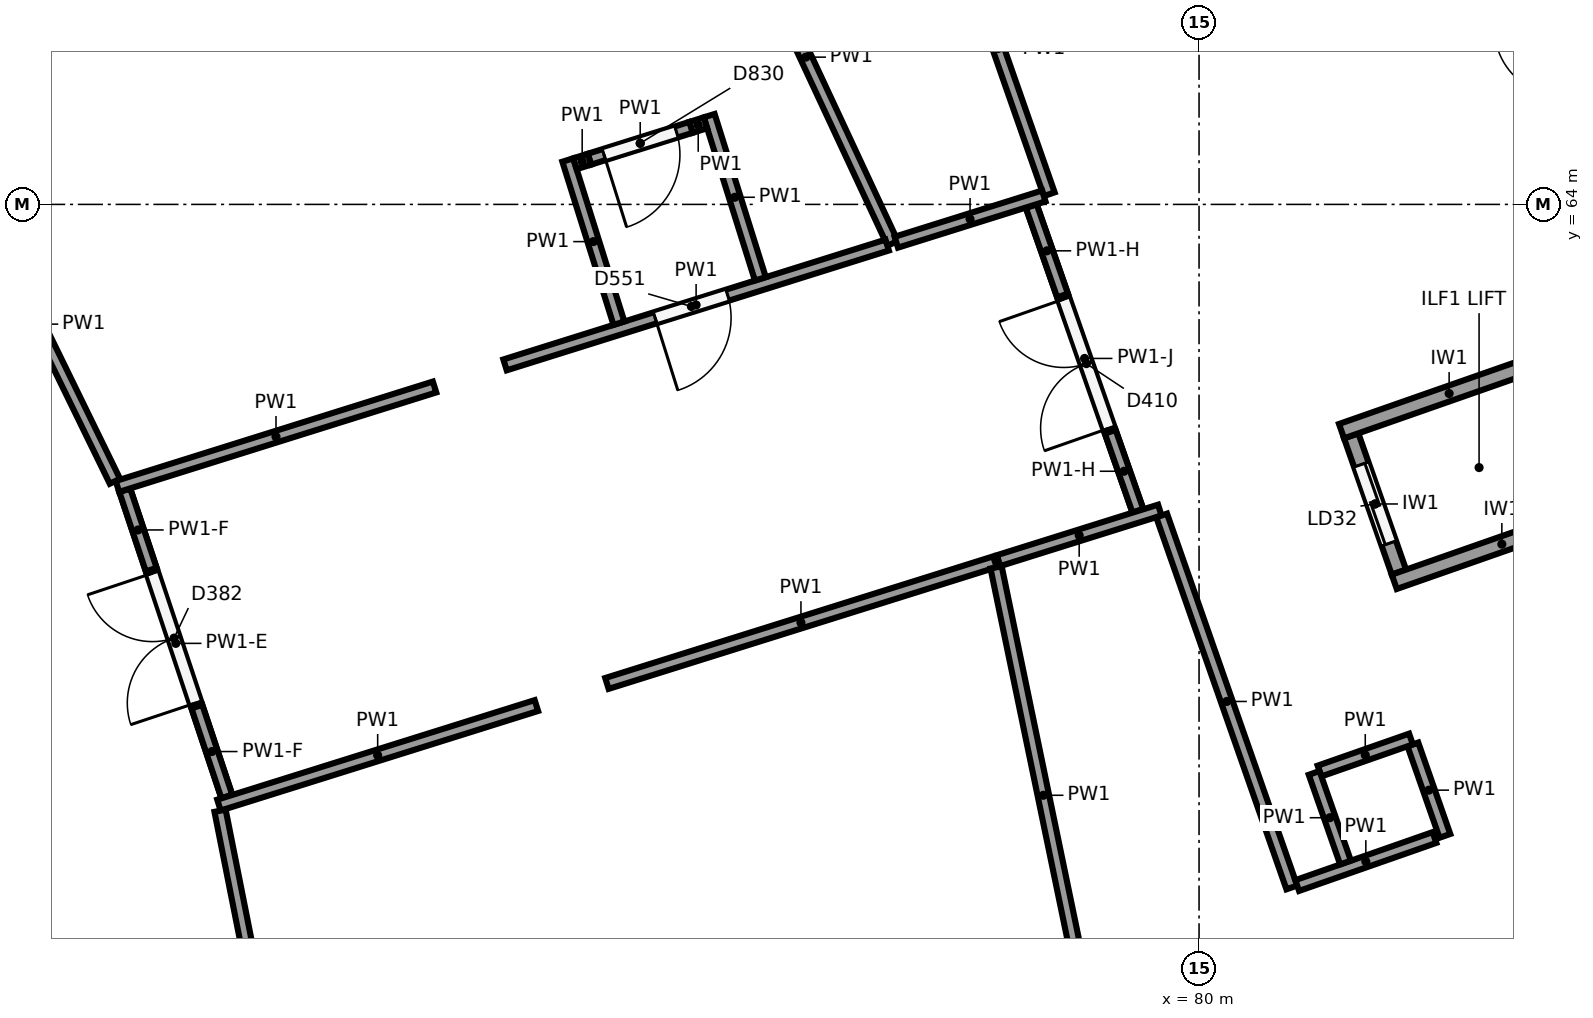
"""IFC4 building model, lengths in metres.
Left out: names, types, materials, properties, quantities, classifications, styles, units other than length and angle.
Written with IfcOpenShell. Run it as: python <this file> out.ifc"""

import sys

from ifc_helpers import new_model, si_unit, direction, frame, frame_2d, origin, origin_2d, place, context, subcontext, project, spatial, rectangle, circle, extrude, element, fill, save


model = new_model("IFC4")
c1 = context("Model", 3, precision=1e-05, world=origin(), true_north=direction((0.0, 1.0)))
c2 = subcontext(c1, "Body", "Model", "MODEL_VIEW")
j1 = project(units=[si_unit("LENGTHUNIT", "METRE"), si_unit("PLANEANGLEUNIT", "RADIAN")], contexts=[c1])
p1 = place(None, origin())
s1 = spatial("IfcSite", under=j1, at=p1, CompositionType="ELEMENT")
p2 = place(p1, origin())
s2 = spatial("IfcBuilding", under=s1, at=p2, CompositionType="ELEMENT")
p3 = place(p2, origin())
s3 = spatial("IfcBuildingStorey", under=s2, at=p3, CompositionType="ELEMENT", Elevation=0.0)
p4 = place(p3, frame((71.17, 59.677, 0.0), z_axis=(0.0, 0.0, 1.0), x_axis=(1.0, 0.0, 0.0)))
e1 = element("IfcColumn", 1, at=p4, inside=s3, PredefinedType="COLUMN", context=c2, shape_type="SweptSolid", body=[
    extrude(circle(Radius=0.45, at=origin_2d()), origin(), (0.0, 0.0, 1.0), 6.5),
])
p5 = place(p3, frame((82.12, 63.191, 0.0), z_axis=(0.0, 0.0, 1.0), x_axis=(1.0, 0.0, 0.0)))
e2 = element("IfcColumn", 2, at=p5, inside=s3, PredefinedType="COLUMN", context=c2, shape_type="SweptSolid", body=[
    extrude(circle(Radius=0.6, at=origin_2d()), origin(), (0.0, 0.0, 1.0), 6.5),
])
p6 = place(p3, frame((85.4, 60.025, 0.0), z_axis=(0.0, 0.0, 1.0), x_axis=(-0.943900215722, -0.330230802259, 0.0)))
e3 = element("IfcWall", 3, at=p6, inside=s3, PredefinedType="SHEAR", context=c2, shape_type="SweptSolid", body=[
    extrude(rectangle(XDim=3.0, YDim=0.2, at=frame_2d((1.5, 0.0))), origin(), (0.0, 0.0, 1.0), 6.15),
])
p7 = place(p3, frame((84.706, 62.008, 0.0), z_axis=(0.0, 0.0, 1.0), x_axis=(-0.943874847782, -0.330303302625, 0.0)))
e4 = element("IfcWall", 4, at=p7, inside=s3, PredefinedType="SHEAR", context=c2, shape_type="SweptSolid", body=[
    extrude(rectangle(XDim=3.0, YDim=0.2, at=frame_2d((1.5, 0.0))), origin(), (0.0, 0.0, 1.0), 6.15),
])
p8 = place(p3, frame((82.629, 59.162, 0.0), z_axis=(0.0, 0.0, 1.0), x_axis=(-0.330224505327, 0.943902418729, 0.0)))
e5 = element("IfcWall", 5, at=p8, inside=s3, PredefinedType="SHEAR", context=c2, shape_type="SweptSolid", body=[
    extrude(rectangle(XDim=1.9, YDim=0.2, at=frame_2d((0.95, 0.0))), origin(), (0.0, 0.0, 1.0), 6.15),
])
p9 = place(p8, frame((0.4, 0.0, 0.0)))
e6 = element("IfcOpeningElement", 6, at=p9, cuts=e5, PredefinedType="OPENING", context=c2, shape_type="SweptSolid", body=[
    extrude(rectangle(XDim=1.1, YDim=2.1, at=frame_2d((0.55, 1.05))), frame((0.0, 0.11, 0.0), z_axis=(0.0, -1.0, 0.0), x_axis=(1.0, 0.0, 0.0)), (0.0, 0.0, 1.0), 0.22),
])
p10 = place(p3, frame((67.104, 56.097, 0.0), z_axis=(0.0, 0.0, 1.0), x_axis=(0.954202691719, 0.299160864947, 0.0)))
e7 = element("IfcWall", 7, at=p10, inside=s3, PredefinedType="PARTITIONING", context=c2, shape_type="SweptSolid", body=[
    extrude(rectangle(XDim=4.377, YDim=0.15, at=frame_2d((2.189, 0.0))), origin(), (0.0, 0.0, 1.0), 6.15),
])
p11 = place(p3, frame((72.21, 57.698, 0.0), z_axis=(0.0, 0.0, 1.0), x_axis=(0.954194522847, 0.299186919115, 0.0)))
e8 = element("IfcWall", 8, at=p11, inside=s3, PredefinedType="PARTITIONING", context=c2, shape_type="SweptSolid", body=[
    extrude(rectangle(XDim=5.35, YDim=0.15, at=frame_2d((2.675, 0.0))), origin(), (0.0, 0.0, 1.0), 6.15),
])
p12 = place(p3, frame((77.33, 59.225, 0.0), z_axis=(0.0, 0.0, 1.0), x_axis=(0.20289695764, -0.979200094251, 0.0)))
e9 = element("IfcWall", 9, at=p12, inside=s3, PredefinedType="PARTITIONING", context=c2, shape_type="SweptSolid", body=[
    extrude(rectangle(XDim=6.124, YDim=0.15, at=frame_2d((3.062, 0.0))), origin(), (0.0, 0.0, 1.0), 6.15),
])
p13 = place(p3, frame((68.014, 51.518, 0.0), z_axis=(0.0, 0.0, 1.0), x_axis=(-0.194807566784, 0.980841481547, 0.0)))
e10 = element("IfcWall", 10, at=p13, inside=s3, PredefinedType="PARTITIONING", context=c2, shape_type="SweptSolid", body=[
    extrude(rectangle(XDim=4.593, YDim=0.15, at=frame_2d((2.296, 0.0))), origin(), (0.0, 0.0, 1.0), 6.15),
])
p14 = place(p3, frame((77.362, 59.313, 0.0), z_axis=(0.0, 0.0, 1.0), x_axis=(0.954198139725, 0.299175383588, 0.0)))
e11 = element("IfcWall", 11, at=p14, inside=s3, PredefinedType="PARTITIONING", context=c2, shape_type="SweptSolid", body=[
    extrude(rectangle(XDim=2.223, YDim=0.15, at=frame_2d((1.111, 0.0))), origin(), (0.0, 0.0, 1.0), 6.15),
])
p15 = place(p3, frame((79.508, 59.907, 0.0), z_axis=(0.0, 0.0, 1.0), x_axis=(0.330291692253, -0.943878910681, 0.0)))
e12 = element("IfcWall", 12, at=p15, inside=s3, PredefinedType="PARTITIONING", context=c2, shape_type="SweptSolid", body=[
    extrude(rectangle(XDim=5.185, YDim=0.15, at=frame_2d((2.592, 0.0))), origin(), (0.0, 0.0, 1.0), 6.15),
])
p16 = place(p3, frame((81.291, 55.039, 0.0), z_axis=(0.0, 0.0, 1.0), x_axis=(0.943910062753, 0.330202655097, 0.0)))
e13 = element("IfcWall", 13, at=p16, inside=s3, PredefinedType="PARTITIONING", context=c2, shape_type="SweptSolid", body=[
    extrude(rectangle(XDim=1.914, YDim=0.15, at=frame_2d((0.957, 0.0))), origin(), (0.0, 0.0, 1.0), 6.15),
])
p17 = place(p3, frame((73.684, 68.387, 0.0), z_axis=(0.0, 0.0, 1.0), x_axis=(0.42266047211, -0.906288102821, 0.0)))
e14 = element("IfcWall", 14, at=p17, inside=s3, PredefinedType="PARTITIONING", context=c2, shape_type="SweptSolid", body=[
    extrude(rectangle(XDim=5.406, YDim=0.15, at=frame_2d((2.703, 0.0))), origin(), (0.0, 0.0, 1.0), 6.15),
])
p18 = place(p3, frame((75.896, 63.465, 0.0), z_axis=(0.0, 0.0, 1.0), x_axis=(-0.954206671626, -0.29914817035, 0.0)))
e15 = element("IfcWall", 15, at=p18, inside=s3, PredefinedType="PARTITIONING", context=c2, shape_type="SweptSolid", body=[
    extrude(rectangle(XDim=5.269, YDim=0.15, at=frame_2d((2.634, 0.0))), origin(), (0.0, 0.0, 1.0), 6.15),
])
p19 = place(p18, frame((2.2, 0.0, 0.0)))
e16 = element("IfcOpeningElement", 16, at=p19, cuts=e15, PredefinedType="OPENING", context=c2, shape_type="SweptSolid", body=[
    extrude(rectangle(XDim=1.0, YDim=2.1, at=frame_2d((0.5, 1.05))), frame((0.0, 0.085, 0.0), z_axis=(0.0, -1.0, 0.0), x_axis=(1.0, 0.0, 0.0)), (0.0, 0.0, 1.0), 0.17),
])
p20 = place(p3, frame((69.942, 61.598, 0.0), z_axis=(0.0, 0.0, 1.0), x_axis=(-0.954192437986, -0.299193568262, 0.0)))
e17 = element("IfcWall", 17, at=p20, inside=s3, PredefinedType="PARTITIONING", context=c2, shape_type="SweptSolid", body=[
    extrude(rectangle(XDim=4.373, YDim=0.15, at=frame_2d((2.187, 0.0))), origin(), (0.0, 0.0, 1.0), 6.15),
])
p21 = place(p3, frame((65.736, 60.358, 0.0), z_axis=(0.0, 0.0, 1.0), x_axis=(-0.438916996059, 0.898527612581, 0.0)))
e18 = element("IfcWall", 18, at=p21, inside=s3, PredefinedType="PARTITIONING", context=c2, shape_type="SweptSolid", body=[
    extrude(rectangle(XDim=4.601, YDim=0.15, at=frame_2d((2.301, 0.0))), origin(), (0.0, 0.0, 1.0), 6.15),
])
p22 = place(p3, frame((76.688, 67.969, 0.0), z_axis=(0.0, 0.0, 1.0), x_axis=(0.330235334568, -0.943898630046, 0.0)))
e19 = element("IfcWall", 19, at=p22, inside=s3, PredefinedType="PARTITIONING", context=c2, shape_type="SweptSolid", body=[
    extrude(rectangle(XDim=4.063, YDim=0.15, at=frame_2d((2.032, 0.0))), origin(), (0.0, 0.0, 1.0), 6.15),
])
p23 = place(p3, frame((77.958, 64.111, 0.0), z_axis=(0.0, 0.0, 1.0), x_axis=(-0.954206277419, -0.299149427767, 0.0)))
e20 = element("IfcWall", 20, at=p23, inside=s3, PredefinedType="PARTITIONING", context=c2, shape_type="SweptSolid", body=[
    extrude(rectangle(XDim=2.035, YDim=0.15, at=frame_2d((1.017, 0.0))), origin(), (0.0, 0.0, 1.0), 6.15),
])
for number, where, z_axis, x_axis in (
    (21, (83.235, 55.692, 0.0), (0.0, 0.0, 1.0), (-0.33, 0.944, 0.0)),
    (22, (82.789, 56.966, 0.0), (0.0, 0.0, 1.0), (-0.944, -0.33, 0.0)),
):
    element("IfcWall", number, at=place(p3, frame(where, z_axis=z_axis, x_axis=x_axis)), inside=s3, PredefinedType="PARTITIONING", context=c2, shape_type="SweptSolid", body=[
        extrude(rectangle(XDim=1.275, YDim=0.15, at=frame_2d((0.637, 0.0))), origin(), (0.0, 0.0, 1.0), 6.15),
    ])
p24 = place(p3, frame((81.514, 56.521, 0.0), z_axis=(0.0, 0.0, 1.0), x_axis=(0.33032430547, -0.943867497701, 0.0)))
e23 = element("IfcWall", 23, at=p24, inside=s3, PredefinedType="PARTITIONING", context=c2, shape_type="SweptSolid", body=[
    extrude(rectangle(XDim=1.249, YDim=0.15, at=frame_2d((0.625, 0.0))), origin(), (0.0, 0.0, 1.0), 6.15),
])
for number, where, z_axis, x_axis in (
    (24, (74.228, 63.021, 0.0), (0.0, 0.0, 1.0), (-0.299, 0.954, 0.0)),
    (25, (72.367, 62.437, 0.0), (0.0, 0.0, 1.0), (-0.299, 0.954, 0.0)),
):
    element("IfcWall", number, at=place(p3, frame(where, z_axis=z_axis, x_axis=x_axis)), inside=s3, PredefinedType="PARTITIONING", context=c2, shape_type="SweptSolid", body=[
        extrude(rectangle(XDim=2.25, YDim=0.15, at=frame_2d((1.125, 0.0))), origin(), (0.0, 0.0, 1.0), 6.15),
    ])
p25 = place(p3, frame((73.506, 65.073, 0.0), z_axis=(0.0, 0.0, 1.0), x_axis=(-0.953803895117, -0.300429908065, 0.0)))
e26 = element("IfcWall", 26, at=p25, inside=s3, PredefinedType="PARTITIONING", context=c2, shape_type="SweptSolid", body=[
    extrude(rectangle(XDim=0.2, YDim=0.15, at=frame_2d((0.1, 0.0))), origin(), (0.0, 0.0, 1.0), 6.15),
])
p26 = place(p3, frame((73.315, 65.013, 0.0), z_axis=(0.0, 0.0, 1.0), x_axis=(-0.954231413478, -0.299069238691, 0.0)))
e27 = element("IfcWall", 27, at=p26, inside=s3, PredefinedType="PARTITIONING", context=c2, shape_type="SweptSolid", body=[
    extrude(rectangle(XDim=1.4, YDim=0.15, at=frame_2d((0.7, 0.0))), origin(), (0.0, 0.0, 1.0), 6.15),
])
p27 = place(p26, frame((0.2, 0.0, 0.0)))
e28 = element("IfcOpeningElement", 28, at=p27, cuts=e27, PredefinedType="OPENING", context=c2, shape_type="SweptSolid", body=[
    extrude(rectangle(XDim=1.0, YDim=2.1, at=frame_2d((0.5, 1.05))), frame((0.0, 0.085, 0.0), z_axis=(0.0, -1.0, 0.0), x_axis=(1.0, 0.0, 0.0)), (0.0, 0.0, 1.0), 0.17),
])
p28 = place(p3, frame((71.979, 64.595, 0.0), z_axis=(0.0, 0.0, 1.0), x_axis=(-0.954262592634, -0.298969738101, 0.0)))
e29 = element("IfcWall", 29, at=p28, inside=s3, PredefinedType="PARTITIONING", context=c2, shape_type="SweptSolid", body=[
    extrude(rectangle(XDim=0.2, YDim=0.15, at=frame_2d((0.1, 0.0))), origin(), (0.0, 0.0, 1.0), 6.15),
])
p29 = place(p3, frame((79.195, 59.97, 0.0), z_axis=(0.0, 0.0, 1.0), x_axis=(-0.330288941726, 0.943879873169, 0.0)))
e30 = element("IfcWall", 30, at=p29, inside=s3, PredefinedType="PARTITIONING", context=c2, shape_type="SweptSolid", body=[
    extrude(rectangle(XDim=4.245, YDim=0.15, at=frame_2d((2.123, 0.0))), origin(), (0.0, 0.0, 1.0), 5.05),
])
p30 = place(p29, frame((1.15, 0.0, 0.0)))
e31 = element("IfcOpeningElement", 31, at=p30, cuts=e30, PredefinedType="OPENING", context=c2, shape_type="SweptSolid", body=[
    extrude(rectangle(XDim=1.8, YDim=2.1, at=frame_2d((0.9, 1.05))), frame((0.0, 0.085, 0.0), z_axis=(0.0, -1.0, 0.0), x_axis=(1.0, 0.0, 0.0)), (0.0, 0.0, 1.0), 0.17),
])
p31 = place(p3, frame((79.195, 59.97, 5.05), z_axis=(0.0, 0.0, 1.0), x_axis=(-0.330310872881, 0.943872198582, 0.0)))
e32 = element("IfcWall", 32, at=p31, inside=s3, PredefinedType="PARTITIONING", context=c2, shape_type="SweptSolid", body=[
    extrude(rectangle(XDim=1.1, YDim=0.15, at=frame_2d((0.55, 0.0))), origin(), (0.0, 0.0, 1.0), 1.1),
])
p32 = place(p3, frame((78.204, 62.802, 5.05), z_axis=(0.0, 0.0, 1.0), x_axis=(-0.3303678914, 0.943852242849, 0.0)))
e33 = element("IfcWall", 33, at=p32, inside=s3, PredefinedType="PARTITIONING", context=c2, shape_type="SweptSolid", body=[
    extrude(rectangle(XDim=1.245, YDim=0.15, at=frame_2d((0.623, 0.0))), origin(), (0.0, 0.0, 1.0), 1.1),
])
p33 = place(p3, frame((67.208, 56.211, 0.0), z_axis=(0.0, 0.0, 1.0), x_axis=(-0.316176018244, 0.94870054574, 0.0)))
e34 = element("IfcWall", 34, at=p33, inside=s3, PredefinedType="PARTITIONING", context=c2, shape_type="SweptSolid", body=[
    extrude(rectangle(XDim=4.246, YDim=0.15, at=frame_2d((2.123, 0.0))), origin(), (0.0, 0.0, 1.0), 5.25),
])
p34 = place(p33, frame((1.296, 0.0, 0.0)))
e35 = element("IfcOpeningElement", 35, at=p34, cuts=e34, PredefinedType="OPENING", context=c2, shape_type="SweptSolid", body=[
    extrude(rectangle(XDim=1.8, YDim=2.1, at=frame_2d((0.9, 1.05))), frame((0.0, 0.085, 0.0), z_axis=(0.0, -1.0, 0.0), x_axis=(1.0, 0.0, 0.0)), (0.0, 0.0, 1.0), 0.17),
])
p35 = place(p3, frame((66.214, 59.195, 5.25), z_axis=(0.0, 0.0, 1.0), x_axis=(-0.316028022196, 0.948749855961, 0.0)))
e36 = element("IfcWall", 36, at=p35, inside=s3, PredefinedType="PARTITIONING", context=c2, shape_type="SweptSolid", body=[
    extrude(rectangle(XDim=1.1, YDim=0.15, at=frame_2d((0.55, 0.0))), origin(), (0.0, 0.0, 1.0), 0.9),
])
p36 = place(p3, frame((67.208, 56.211, 5.25), z_axis=(0.0, 0.0, 1.0), x_axis=(-0.316227766017, 0.948683298051, 0.0)))
e37 = element("IfcWall", 37, at=p36, inside=s3, PredefinedType="PARTITIONING", context=c2, shape_type="SweptSolid", body=[
    extrude(rectangle(XDim=1.246, YDim=0.15, at=frame_2d((0.623, 0.0))), origin(), (0.0, 0.0, 1.0), 0.9),
])
p37 = place(p9, origin())
e38 = element("IfcDoor", 38, at=p37, inside=s3, OperationType="SLIDING_TO_RIGHT", PredefinedType="DOOR", context=c2, shape_type="SweptSolid", body=[
    extrude(rectangle(XDim=1.1, YDim=2.1, at=frame_2d((0.55, 1.05))), frame((0.0, 0.025, 0.0), z_axis=(0.0, -1.0, 0.0), x_axis=(1.0, 0.0, 0.0)), (0.0, 0.0, 1.0), 0.05),
])
fill(e6, e38)
p38 = place(p19, origin())
e39 = element("IfcDoor", 39, at=p38, inside=s3, OperationType="SINGLE_SWING_RIGHT", PredefinedType="DOOR", context=c2, shape_type="SweptSolid", body=[
    extrude(rectangle(XDim=1.0, YDim=2.1, at=frame_2d((0.5, 1.05))), frame((0.0, 0.025, 0.0), z_axis=(0.0, -1.0, 0.0), x_axis=(1.0, 0.0, 0.0)), (0.0, 0.0, 1.0), 0.05),
])
fill(e16, e39)
p39 = place(p27, origin())
e40 = element("IfcDoor", 40, at=p39, inside=s3, OperationType="SINGLE_SWING_RIGHT", PredefinedType="DOOR", context=c2, shape_type="SweptSolid", body=[
    extrude(rectangle(XDim=1.0, YDim=2.1, at=frame_2d((0.5, 1.05))), frame((0.0, 0.025, 0.0), z_axis=(0.0, -1.0, 0.0), x_axis=(1.0, 0.0, 0.0)), (0.0, 0.0, 1.0), 0.05),
])
fill(e28, e40)
p40 = place(p30, origin())
e41 = element("IfcDoor", 41, at=p40, inside=s3, OperationType="DOUBLE_DOOR_SINGLE_SWING", PredefinedType="DOOR", context=c2, shape_type="SweptSolid", body=[
    extrude(rectangle(XDim=1.8, YDim=2.1, at=frame_2d((0.9, 1.05))), frame((0.0, 0.025, 0.0), z_axis=(0.0, -1.0, 0.0), x_axis=(1.0, 0.0, 0.0)), (0.0, 0.0, 1.0), 0.05),
])
fill(e31, e41)
p41 = place(p34, origin())
e42 = element("IfcDoor", 42, at=p41, inside=s3, OperationType="DOUBLE_DOOR_SINGLE_SWING", PredefinedType="DOOR", context=c2, shape_type="SweptSolid", body=[
    extrude(rectangle(XDim=1.8, YDim=2.1, at=frame_2d((0.9, 1.05))), frame((0.0, 0.025, 0.0), z_axis=(0.0, -1.0, 0.0), x_axis=(1.0, 0.0, 0.0)), (0.0, 0.0, 1.0), 0.05),
])
fill(e35, e42)
save(model, sys.argv[1])
